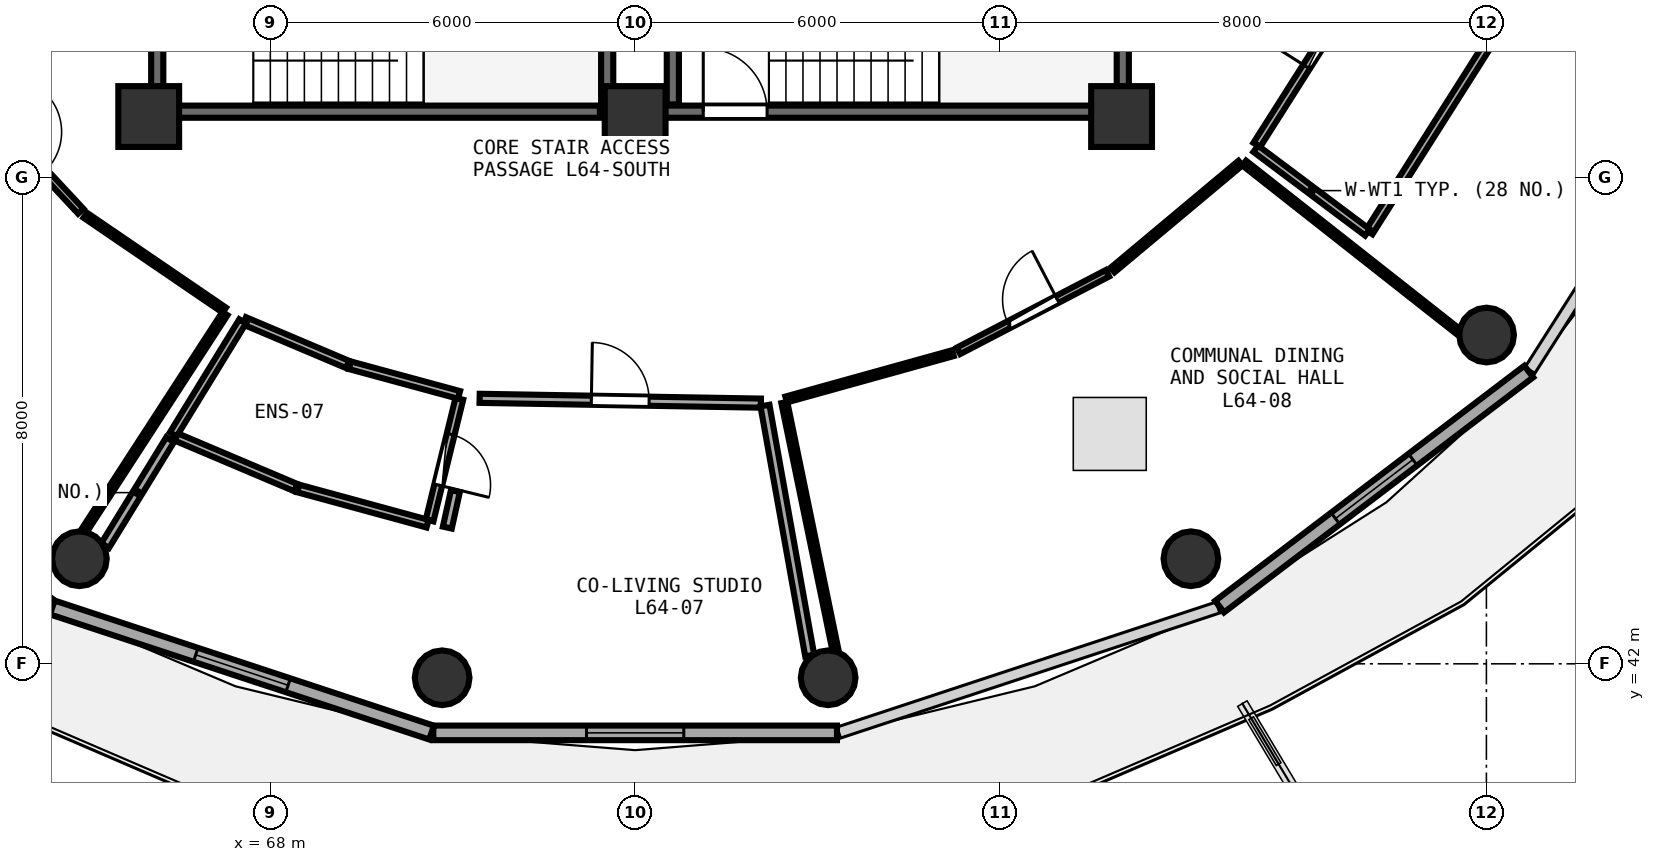
"""IFC4 building model, lengths in metres.
Left out: names, types, materials, properties, quantities, classifications, styles, units other than length and angle.
Written with IfcOpenShell. Run it as: python <this file> out.ifc"""

import sys

from ifc_helpers import new_model, si_unit, direction, frame, frame_2d, origin, origin_2d, place, context, subcontext, project, spatial, rectangle, circle, extrude, element, fill, save


model = new_model("IFC4")
c1 = context("Model", 3, precision=1e-05, world=origin(), true_north=direction((0.0, 1.0)))
c2 = subcontext(c1, "Body", "Model", "MODEL_VIEW")
j1 = project(units=[si_unit("LENGTHUNIT", "METRE"), si_unit("PLANEANGLEUNIT", "RADIAN")], contexts=[c1])
p1 = place(None, origin())
s1 = spatial("IfcSite", under=j1, at=p1, CompositionType="ELEMENT")
p2 = place(p1, origin())
s2 = spatial("IfcBuilding", under=s1, at=p2, CompositionType="ELEMENT")
p3 = place(p2, frame((0.0, 0.0, 252.45)))
s3 = spatial("IfcBuildingStorey", under=s2, at=p3, CompositionType="ELEMENT", Elevation=252.45)
for number, where, z_axis, x_axis in (
    (1, (66.0, 51.0, 0.0), (0.0, 0.0, 1.0), (1.0, 0.0, 0.0)),
    (2, (74.0, 51.0, 0.0), (0.0, 0.0, 1.0), (1.0, 0.0, 0.0)),
    (3, (82.0, 51.0, 0.0), (0.0, 0.0, 1.0), (1.0, 0.0, 0.0)),
):
    element("IfcColumn", number, at=place(p3, frame(where, z_axis=z_axis, x_axis=x_axis)), inside=s3, PredefinedType="PILASTER", context=c2, shape_type="SweptSolid", body=[
        extrude(rectangle(XDim=1.0, YDim=1.0, at=origin_2d()), origin(), (0.0, 0.0, 1.0), 3.75),
    ])
for number, where, z_axis, x_axis in (
    (4, (64.86, 43.728, 0.0), (0.0, 0.0, 1.0), (1.0, 0.0, 0.0)),
    (5, (70.826, 41.771, 0.0), (0.0, 0.0, 1.0), (1.0, 0.0, 0.0)),
    (6, (77.174, 41.771, 0.0), (0.0, 0.0, 1.0), (1.0, 0.0, 0.0)),
    (7, (83.14, 43.728, 0.0), (0.0, 0.0, 1.0), (1.0, 0.0, 0.0)),
    (8, (88.003, 47.407, 0.0), (0.0, 0.0, 1.0), (1.0, 0.0, 0.0)),
):
    element("IfcColumn", number, at=place(p3, frame(where, z_axis=z_axis, x_axis=x_axis)), inside=s3, PredefinedType="COLUMN", context=c2, shape_type="SweptSolid", body=[
        extrude(circle(Radius=0.45, at=origin_2d()), origin(), (0.0, 0.0, 1.0), 3.75),
    ])
p4 = place(p3, frame((59.304, 46.806, 0.0), z_axis=(0.0, 0.0, 1.0), x_axis=(0.796010444211, -0.605282886514, 0.0)))
e9 = element("IfcWall", 9, at=p4, inside=s3, PredefinedType="SOLIDWALL", context=c2, shape_type="SweptSolid", body=[
    extrude(rectangle(XDim=6.387, YDim=0.24, at=frame_2d((3.194, 0.0))), origin(), (0.0, 0.0, 1.0), 3.475),
])
p5 = place(p4, frame((2.394, 0.0, 0.85)))
e10 = element("IfcOpeningElement", 10, at=p5, cuts=e9, PredefinedType="OPENING", context=c2, shape_type="SweptSolid", body=[
    extrude(rectangle(XDim=1.6, YDim=1.45, at=frame_2d((0.8, 0.725))), frame((0.0, 0.13, 0.0), z_axis=(0.0, -1.0, 0.0), x_axis=(1.0, 0.0, 0.0)), (0.0, 0.0, 1.0), 0.26),
])
p6 = place(p3, frame((64.414, 42.927, 0.0), z_axis=(0.0, 0.0, 1.0), x_axis=(0.949663708393, -0.313271193954, 0.0)))
e11 = element("IfcWall", 11, at=p6, inside=s3, PredefinedType="SOLIDWALL", context=c2, shape_type="SweptSolid", body=[
    extrude(rectangle(XDim=6.568, YDim=0.24, at=frame_2d((3.284, 0.0))), origin(), (0.0, 0.0, 1.0), 3.475),
])
p7 = place(p6, frame((2.484, 0.0, 0.85)))
e12 = element("IfcOpeningElement", 12, at=p7, cuts=e11, PredefinedType="OPENING", context=c2, shape_type="SweptSolid", body=[
    extrude(rectangle(XDim=1.6, YDim=1.45, at=frame_2d((0.8, 0.725))), frame((0.0, 0.13, 0.0), z_axis=(0.0, -1.0, 0.0), x_axis=(1.0, 0.0, 0.0)), (0.0, 0.0, 1.0), 0.26),
])
p8 = place(p3, frame((70.681, 40.864, 0.0), z_axis=(0.0, 0.0, 1.0), x_axis=(1.0, 0.0, 0.0)))
e13 = element("IfcWall", 13, at=p8, inside=s3, PredefinedType="SOLIDWALL", context=c2, shape_type="SweptSolid", body=[
    extrude(rectangle(XDim=6.638, YDim=0.24, at=frame_2d((3.319, 0.0))), origin(), (0.0, 0.0, 1.0), 3.475),
])
p9 = place(p8, frame((2.519, 0.0, 0.85)))
e14 = element("IfcOpeningElement", 14, at=p9, cuts=e13, PredefinedType="OPENING", context=c2, shape_type="SweptSolid", body=[
    extrude(rectangle(XDim=1.6, YDim=1.45, at=frame_2d((0.8, 0.725))), frame((0.0, 0.13, 0.0), z_axis=(0.0, -1.0, 0.0), x_axis=(1.0, 0.0, 0.0)), (0.0, 0.0, 1.0), 0.26),
])
p10 = place(p3, frame((83.612, 42.94, 0.0), z_axis=(0.0, 0.0, 1.0), x_axis=(0.796010444211, 0.605282886514, 0.0)))
e15 = element("IfcWall", 15, at=p10, inside=s3, PredefinedType="SOLIDWALL", context=c2, shape_type="SweptSolid", body=[
    extrude(rectangle(XDim=6.387, YDim=0.24, at=frame_2d((3.194, 0.0))), origin(), (0.0, 0.0, 1.0), 3.475),
])
p11 = place(p10, frame((2.394, 0.0, 0.85)))
e16 = element("IfcOpeningElement", 16, at=p11, cuts=e15, PredefinedType="OPENING", context=c2, shape_type="SweptSolid", body=[
    extrude(rectangle(XDim=1.6, YDim=1.45, at=frame_2d((0.8, 0.725))), frame((0.0, 0.13, 0.0), z_axis=(0.0, -1.0, 0.0), x_axis=(1.0, 0.0, 0.0)), (0.0, 0.0, 1.0), 0.26),
])
p12 = place(p3, frame((74.0, 51.08, 0.0), z_axis=(0.0, 0.0, 1.0), x_axis=(1.0, 0.0, 0.0)))
e17 = element("IfcWall", 17, at=p12, inside=s3, PredefinedType="SHEAR", context=c2, shape_type="SweptSolid", body=[
    extrude(rectangle(XDim=7.9, YDim=0.2, at=frame_2d((3.95, 0.0))), origin(), (0.0, 0.0, 1.0), 3.49),
])
p13 = place(p12, frame((1.12, 0.0, 0.0)))
e18 = element("IfcOpeningElement", 18, at=p13, cuts=e17, PredefinedType="OPENING", context=c2, shape_type="SweptSolid", body=[
    extrude(rectangle(XDim=1.05, YDim=2.1, at=frame_2d((0.525, 1.05))), frame((0.0, 0.11, 0.0), z_axis=(0.0, -1.0, 0.0), x_axis=(1.0, 0.0, 0.0)), (0.0, 0.0, 1.0), 0.22),
])
for number, where, z_axis, x_axis in (
    (19, (82.02, 51.2, 0.0), (0.0, 0.0, 1.0), (0.0, 1.0, 0.0)),
    (20, (74.62, 54.27, 0.0), (0.0, 0.0, 1.0), (0.0, -1.0, 0.0)),
):
    element("IfcWall", number, at=place(p3, frame(where, z_axis=z_axis, x_axis=x_axis)), inside=s3, PredefinedType="SHEAR", context=c2, shape_type="SweptSolid", body=[
        extrude(rectangle(XDim=3.07, YDim=0.2, at=frame_2d((1.535, 0.0))), origin(), (0.0, 0.0, 1.0), 3.49),
    ])
p14 = place(p3, frame((66.26, 51.08, 0.0), z_axis=(0.0, 0.0, 1.0), x_axis=(1.0, 0.0, 0.0)))
e21 = element("IfcWall", 21, at=p14, inside=s3, PredefinedType="SHEAR", context=c2, shape_type="SweptSolid", body=[
    extrude(rectangle(XDim=7.16, YDim=0.2, at=frame_2d((3.58, 0.0))), origin(), (0.0, 0.0, 1.0), 3.49),
])
p15 = place(p3, frame((73.54, 51.2, 0.0), z_axis=(0.0, 0.0, 1.0), x_axis=(0.0, 1.0, 0.0)))
e22 = element("IfcWall", 22, at=p15, inside=s3, PredefinedType="SHEAR", context=c2, shape_type="SweptSolid", body=[
    extrude(rectangle(XDim=3.07, YDim=0.2, at=frame_2d((1.535, 0.0))), origin(), (0.0, 0.0, 1.0), 3.49),
])
p16 = place(p3, frame((66.14, 54.27, 0.0), z_axis=(0.0, 0.0, 1.0), x_axis=(0.0, -1.0, 0.0)))
e23 = element("IfcWall", 23, at=p16, inside=s3, PredefinedType="SHEAR", context=c2, shape_type="SweptSolid", body=[
    extrude(rectangle(XDim=3.07, YDim=0.2, at=frame_2d((1.535, 0.0))), origin(), (0.0, 0.0, 1.0), 3.49),
])
p17 = place(p16, frame((1.01, 0.0, 0.0)))
e24 = element("IfcOpeningElement", 24, at=p17, cuts=e23, PredefinedType="OPENING", context=c2, shape_type="SweptSolid", body=[
    extrude(rectangle(XDim=1.05, YDim=2.1, at=frame_2d((0.525, 1.05))), frame((0.0, 0.11, 0.0), z_axis=(0.0, -1.0, 0.0), x_axis=(1.0, 0.0, 0.0)), (0.0, 0.0, 1.0), 0.22),
])
p18 = place(p3, frame((63.067, 51.393, 0.0), z_axis=(0.0, 0.0, 1.0), x_axis=(0.681315269885, -0.731990097625, 0.0)))
e25 = element("IfcWall", 25, at=p18, inside=s3, PredefinedType="PARTITIONING", context=c2, shape_type="SweptSolid", body=[
    extrude(rectangle(XDim=2.664, YDim=0.12, at=frame_2d((1.332, 0.0))), origin(), (0.0, 0.0, 1.0), 3.075),
])
p19 = place(p18, frame((0.882, 0.0, 0.0)))
e26 = element("IfcOpeningElement", 26, at=p19, cuts=e25, PredefinedType="OPENING", context=c2, shape_type="SweptSolid", body=[
    extrude(rectangle(XDim=0.9, YDim=2.08, at=frame_2d((0.45, 1.04))), frame((0.0, 0.07, 0.0), z_axis=(0.0, -1.0, 0.0), x_axis=(1.0, 0.0, 0.0)), (0.0, 0.0, 1.0), 0.14),
])
p20 = place(p3, frame((71.109, 46.359, 0.0), z_axis=(0.0, 0.0, 1.0), x_axis=(-0.237485395018, -0.971391109262, 0.0)))
e27 = element("IfcWall", 27, at=p20, inside=s3, PredefinedType="PLUMBINGWALL", context=c2, shape_type="SweptSolid", body=[
    extrude(rectangle(XDim=2.06, YDim=0.13, at=frame_2d((1.03, 0.0))), origin(), (0.0, 0.0, 1.0), 3.175),
])
p21 = place(p20, frame((0.6, 0.0, 0.0)))
e28 = element("IfcOpeningElement", 28, at=p21, cuts=e27, PredefinedType="OPENING", context=c2, shape_type="SweptSolid", body=[
    extrude(rectangle(XDim=0.86, YDim=2.05, at=frame_2d((0.43, 1.025))), frame((0.0, 0.075, 0.0), z_axis=(0.0, -1.0, 0.0), x_axis=(1.0, 0.0, 0.0)), (0.0, 0.0, 1.0), 0.15),
])
p22 = place(p3, frame((71.442, 46.366, 0.0), z_axis=(0.0, 0.0, 1.0), x_axis=(0.99985475278, -0.017043278545, 0.0)))
e29 = element("IfcWall", 29, at=p22, inside=s3, PredefinedType="PARTITIONING", context=c2, shape_type="SweptSolid", body=[
    extrude(rectangle(XDim=4.627, YDim=0.15, at=frame_2d((2.313, 0.0))), origin(), (0.0, 0.0, 1.0), 3.075),
])
p23 = place(p22, frame((1.838, 0.0, 0.0)))
e30 = element("IfcOpeningElement", 30, at=p23, cuts=e29, PredefinedType="OPENING", context=c2, shape_type="SweptSolid", body=[
    extrude(rectangle(XDim=0.95, YDim=2.08, at=frame_2d((0.475, 1.04))), frame((0.0, 0.085, 0.0), z_axis=(0.0, -1.0, 0.0), x_axis=(1.0, 0.0, 0.0)), (0.0, 0.0, 1.0), 0.17),
])
p24 = place(p3, frame((79.319, 47.148, 0.0), z_axis=(0.0, 0.0, 1.0), x_axis=(0.887021247279, 0.461728607382, 0.0)))
e31 = element("IfcWall", 31, at=p24, inside=s3, PredefinedType="PARTITIONING", context=c2, shape_type="SweptSolid", body=[
    extrude(rectangle(XDim=2.761, YDim=0.12, at=frame_2d((1.38, 0.0))), origin(), (0.0, 0.0, 1.0), 3.235),
])
p25 = place(p24, frame((0.93, 0.0, 0.0)))
e32 = element("IfcOpeningElement", 32, at=p25, cuts=e31, PredefinedType="OPENING", context=c2, shape_type="SweptSolid", body=[
    extrude(rectangle(XDim=0.9, YDim=2.08, at=frame_2d((0.45, 1.04))), frame((0.0, 0.07, 0.0), z_axis=(0.0, -1.0, 0.0), x_axis=(1.0, 0.0, 0.0)), (0.0, 0.0, 1.0), 0.14),
])
p26 = place(p3, frame((84.223, 50.533, 0.0), z_axis=(0.0, 0.0, 1.0), x_axis=(0.536434868975, 0.84394172272, 0.0)))
e33 = element("IfcWall", 33, at=p26, inside=s3, PredefinedType="PLUMBINGWALL", context=c2, shape_type="SweptSolid", body=[
    extrude(rectangle(XDim=3.908, YDim=0.13, at=frame_2d((1.954, 0.0))), origin(), (0.0, 0.0, 1.0), 3.075),
])
p27 = place(p26, frame((1.524, 0.0, 0.0)))
e34 = element("IfcOpeningElement", 34, at=p27, cuts=e33, PredefinedType="OPENING", context=c2, shape_type="SweptSolid", body=[
    extrude(rectangle(XDim=0.86, YDim=2.05, at=frame_2d((0.43, 1.025))), frame((0.0, 0.075, 0.0), z_axis=(0.0, -1.0, 0.0), x_axis=(1.0, 0.0, 0.0)), (0.0, 0.0, 1.0), 0.15),
])
p28 = place(p3, frame((64.956, 49.376, 0.0), z_axis=(0.0, 0.0, 1.0), x_axis=(0.826087380575, -0.563542047814, 0.0)))
e35 = element("IfcWall", 35, at=p28, inside=s3, PredefinedType="PARTITIONING", context=c2, shape_type="SweptSolid", body=[
    extrude(rectangle(XDim=2.768, YDim=0.1, at=frame_2d((1.384, 0.0))), origin(), (0.0, 0.0, 1.0), 3.075),
])
p29 = place(p3, frame((67.254, 47.76, 0.0), z_axis=(0.0, 0.0, 1.0), x_axis=(-0.544234825024, -0.838932926539, 0.0)))
e36 = element("IfcWall", 36, at=p29, inside=s3, PredefinedType="PARTITIONING", context=c2, shape_type="SweptSolid", body=[
    extrude(rectangle(XDim=4.249, YDim=0.1, at=frame_2d((2.125, 0.0))), origin(), (0.0, 0.0, 1.0), 3.075),
])
p30 = place(p3, frame((67.573, 47.641, 0.0), z_axis=(0.0, 0.0, 1.0), x_axis=(0.920910556575, -0.389773968845, 0.0)))
e37 = element("IfcWall", 37, at=p30, inside=s3, PredefinedType="PLUMBINGWALL", context=c2, shape_type="SweptSolid", body=[
    extrude(rectangle(XDim=1.843, YDim=0.13, at=frame_2d((0.921, 0.0))), origin(), (0.0, 0.0, 1.0), 3.48),
])
p31 = place(p3, frame((69.308, 46.91, 0.0), z_axis=(0.0, 0.0, 1.0), x_axis=(0.96501774213, -0.262184586453, 0.0)))
e38 = element("IfcWall", 38, at=p31, inside=s3, PredefinedType="PLUMBINGWALL", context=c2, shape_type="SweptSolid", body=[
    extrude(rectangle(XDim=1.861, YDim=0.13, at=frame_2d((0.93, 0.0))), origin(), (0.0, 0.0, 1.0), 3.48),
])
p32 = place(p3, frame((70.586, 44.304, 0.0), z_axis=(0.0, 0.0, 1.0), x_axis=(-0.96480470919, 0.262967437384, 0.0)))
e39 = element("IfcWall", 39, at=p32, inside=s3, PredefinedType="PLUMBINGWALL", context=c2, shape_type="SweptSolid", body=[
    extrude(rectangle(XDim=2.204, YDim=0.13, at=frame_2d((1.102, 0.0))), origin(), (0.0, 0.0, 1.0), 3.48),
])
p33 = place(p3, frame((68.422, 44.897, 0.0), z_axis=(0.0, 0.0, 1.0), x_axis=(-0.920791207069, 0.390055833162, 0.0)))
e40 = element("IfcWall", 40, at=p33, inside=s3, PredefinedType="PLUMBINGWALL", context=c2, shape_type="SweptSolid", body=[
    extrude(rectangle(XDim=2.183, YDim=0.13, at=frame_2d((1.092, 0.0))), origin(), (0.0, 0.0, 1.0), 3.48),
])
p34 = place(p3, frame((66.404, 45.773, 0.0), z_axis=(0.0, 0.0, 1.0), x_axis=(0.523029155304, 0.85231479085, 0.0)))
e41 = element("IfcWall", 41, at=p34, inside=s3, PredefinedType="PLUMBINGWALL", context=c2, shape_type="SweptSolid", body=[
    extrude(rectangle(XDim=2.181, YDim=0.13, at=frame_2d((1.091, 0.0))), origin(), (0.0, 0.0, 1.0), 3.175),
])
p35 = place(p3, frame((76.135, 46.247, 0.0), z_axis=(0.0, 0.0, 1.0), x_axis=(0.176199339585, -0.984354505618, 0.0)))
e42 = element("IfcWall", 42, at=p35, inside=s3, PredefinedType="PARTITIONING", context=c2, shape_type="SweptSolid", body=[
    extrude(rectangle(XDim=4.176, YDim=0.15, at=frame_2d((2.088, 0.0))), origin(), (0.0, 0.0, 1.0), 3.075),
])
p36 = place(p3, frame((65.283, 43.944, 0.0), z_axis=(0.0, 0.0, 1.0), x_axis=(0.522864415557, 0.852415862677, 0.0)))
e43 = element("IfcWall", 43, at=p36, inside=s3, PredefinedType="PARTITIONING", context=c2, shape_type="SweptSolid", body=[
    extrude(rectangle(XDim=2.045, YDim=0.15, at=frame_2d((1.022, 0.0))), origin(), (0.0, 0.0, 1.0), 3.235),
])
p37 = place(p3, frame((70.911, 44.24, 0.0), z_axis=(0.0, 0.0, 1.0), x_axis=(0.216216290924, 0.976345489844, 0.0)))
e44 = element("IfcWall", 44, at=p37, inside=s3, PredefinedType="PARTITIONING", context=c2, shape_type="SweptSolid", body=[
    extrude(rectangle(XDim=0.615, YDim=0.15, at=frame_2d((0.308, 0.0))), origin(), (0.0, 0.0, 1.0), 3.48),
])
p38 = place(p3, frame((76.483, 46.347, 0.0), z_axis=(0.0, 0.0, 1.0), x_axis=(0.963478601256, 0.267785333659, 0.0)))
e45 = element("IfcWall", 45, at=p38, inside=s3, PredefinedType="PARTITIONING", context=c2, shape_type="SweptSolid", body=[
    extrude(rectangle(XDim=2.848, YDim=0.1, at=frame_2d((1.424, 0.0))), origin(), (0.0, 0.0, 1.0), 3.48),
])
p39 = place(p3, frame((81.852, 48.476, 0.0), z_axis=(0.0, 0.0, 1.0), x_axis=(0.767022676895, 0.641619991216, 0.0)))
e46 = element("IfcWall", 46, at=p39, inside=s3, PredefinedType="PARTITIONING", context=c2, shape_type="SweptSolid", body=[
    extrude(rectangle(XDim=2.741, YDim=0.1, at=frame_2d((1.371, 0.0))), origin(), (0.0, 0.0, 1.0), 3.075),
])
p40 = place(p3, frame((84.016, 50.235, 0.0), z_axis=(0.0, 0.0, 1.0), x_axis=(0.785736749878, -0.618561039745, 0.0)))
e47 = element("IfcWall", 47, at=p40, inside=s3, PredefinedType="PARTITIONING", context=c2, shape_type="SweptSolid", body=[
    extrude(rectangle(XDim=4.475, YDim=0.1, at=frame_2d((2.237, 0.0))), origin(), (0.0, 0.0, 1.0), 3.075),
])
p41 = place(p3, frame((77.293, 42.23, 0.0), z_axis=(0.0, 0.0, 1.0), x_axis=(-0.202308141573, 0.979321916355, 0.0)))
e48 = element("IfcWall", 48, at=p41, inside=s3, PredefinedType="PARTITIONING", context=c2, shape_type="SweptSolid", body=[
    extrude(rectangle(XDim=4.153, YDim=0.1, at=frame_2d((2.076, 0.0))), origin(), (0.0, 0.0, 1.0), 3.175),
])
p42 = place(p3, frame((88.606, 53.098, 0.0), z_axis=(0.0, 0.0, 1.0), x_axis=(-0.535433501212, -0.844577388864, 0.0)))
e49 = element("IfcWall", 49, at=p42, inside=s3, PredefinedType="PLUMBINGWALL", context=c2, shape_type="SweptSolid", body=[
    extrude(rectangle(XDim=4.735, YDim=0.13, at=frame_2d((2.368, 0.0))), origin(), (0.0, 0.0, 1.0), 3.075),
])
p43 = place(p3, frame((86.044, 49.094, 0.0), z_axis=(0.0, 0.0, 1.0), x_axis=(-0.800357274386, 0.599523338442, 0.0)))
e50 = element("IfcWall", 50, at=p43, inside=s3, PredefinedType="PLUMBINGWALL", context=c2, shape_type="SweptSolid", body=[
    extrude(rectangle(XDim=2.295, YDim=0.13, at=frame_2d((1.147, 0.0))), origin(), (0.0, 0.0, 1.0), 3.175),
])
p44 = place(p7, origin())
e51 = element("IfcWindow", 51, at=p44, inside=s3, PartitioningType="SINGLE_PANEL", PredefinedType="WINDOW", context=c2, shape_type="SweptSolid", body=[
    extrude(rectangle(XDim=1.6, YDim=1.45, at=frame_2d((0.8, 0.725))), frame((0.0, 0.03, 0.0), z_axis=(0.0, -1.0, 0.0), x_axis=(1.0, 0.0, 0.0)), (0.0, 0.0, 1.0), 0.06),
])
fill(e12, e51)
p45 = place(p9, origin())
e52 = element("IfcWindow", 52, at=p45, inside=s3, PartitioningType="SINGLE_PANEL", PredefinedType="WINDOW", context=c2, shape_type="SweptSolid", body=[
    extrude(rectangle(XDim=1.6, YDim=1.45, at=frame_2d((0.8, 0.725))), frame((0.0, 0.03, 0.0), z_axis=(0.0, -1.0, 0.0), x_axis=(1.0, 0.0, 0.0)), (0.0, 0.0, 1.0), 0.06),
])
fill(e14, e52)
p46 = place(p11, origin())
e53 = element("IfcWindow", 53, at=p46, inside=s3, PartitioningType="SINGLE_PANEL", PredefinedType="WINDOW", context=c2, shape_type="SweptSolid", body=[
    extrude(rectangle(XDim=1.6, YDim=1.45, at=frame_2d((0.8, 0.725))), frame((0.0, 0.03, 0.0), z_axis=(0.0, -1.0, 0.0), x_axis=(1.0, 0.0, 0.0)), (0.0, 0.0, 1.0), 0.06),
])
fill(e16, e53)
p47 = place(p13, origin())
e54 = element("IfcDoor", 54, at=p47, inside=s3, OperationType="SINGLE_SWING_LEFT", PredefinedType="DOOR", context=c2, shape_type="SweptSolid", body=[
    extrude(rectangle(XDim=1.05, YDim=2.1, at=frame_2d((0.525, 1.05))), frame((0.0, 0.025, 0.0), z_axis=(0.0, -1.0, 0.0), x_axis=(1.0, 0.0, 0.0)), (0.0, 0.0, 1.0), 0.05),
])
fill(e18, e54)
p48 = place(p21, origin())
e55 = element("IfcDoor", 55, at=p48, inside=s3, OperationType="SINGLE_SWING_RIGHT", PredefinedType="DOOR", context=c2, shape_type="SweptSolid", body=[
    extrude(rectangle(XDim=0.86, YDim=2.05, at=frame_2d((0.43, 1.025))), frame((0.0, 0.025, 0.0), z_axis=(0.0, -1.0, 0.0), x_axis=(1.0, 0.0, 0.0)), (0.0, 0.0, 1.0), 0.05),
])
fill(e28, e55)
p49 = place(p23, origin())
e56 = element("IfcDoor", 56, at=p49, inside=s3, OperationType="SINGLE_SWING_LEFT", PredefinedType="DOOR", context=c2, shape_type="SweptSolid", body=[
    extrude(rectangle(XDim=0.95, YDim=2.08, at=frame_2d((0.475, 1.04))), frame((0.0, 0.025, 0.0), z_axis=(0.0, -1.0, 0.0), x_axis=(1.0, 0.0, 0.0)), (0.0, 0.0, 1.0), 0.05),
])
fill(e30, e56)
p50 = place(p25, origin())
e57 = element("IfcDoor", 57, at=p50, inside=s3, OperationType="SINGLE_SWING_RIGHT", PredefinedType="DOOR", context=c2, shape_type="SweptSolid", body=[
    extrude(rectangle(XDim=0.9, YDim=2.08, at=frame_2d((0.45, 1.04))), frame((0.0, 0.025, 0.0), z_axis=(0.0, -1.0, 0.0), x_axis=(1.0, 0.0, 0.0)), (0.0, 0.0, 1.0), 0.05),
])
fill(e32, e57)
p51 = place(p27, origin())
e58 = element("IfcDoor", 58, at=p51, inside=s3, OperationType="SINGLE_SWING_LEFT", PredefinedType="DOOR", context=c2, shape_type="SweptSolid", body=[
    extrude(rectangle(XDim=0.86, YDim=2.05, at=frame_2d((0.43, 1.025))), frame((0.0, 0.025, 0.0), z_axis=(0.0, -1.0, 0.0), x_axis=(1.0, 0.0, 0.0)), (0.0, 0.0, 1.0), 0.05),
])
fill(e34, e58)
save(model, sys.argv[1])
